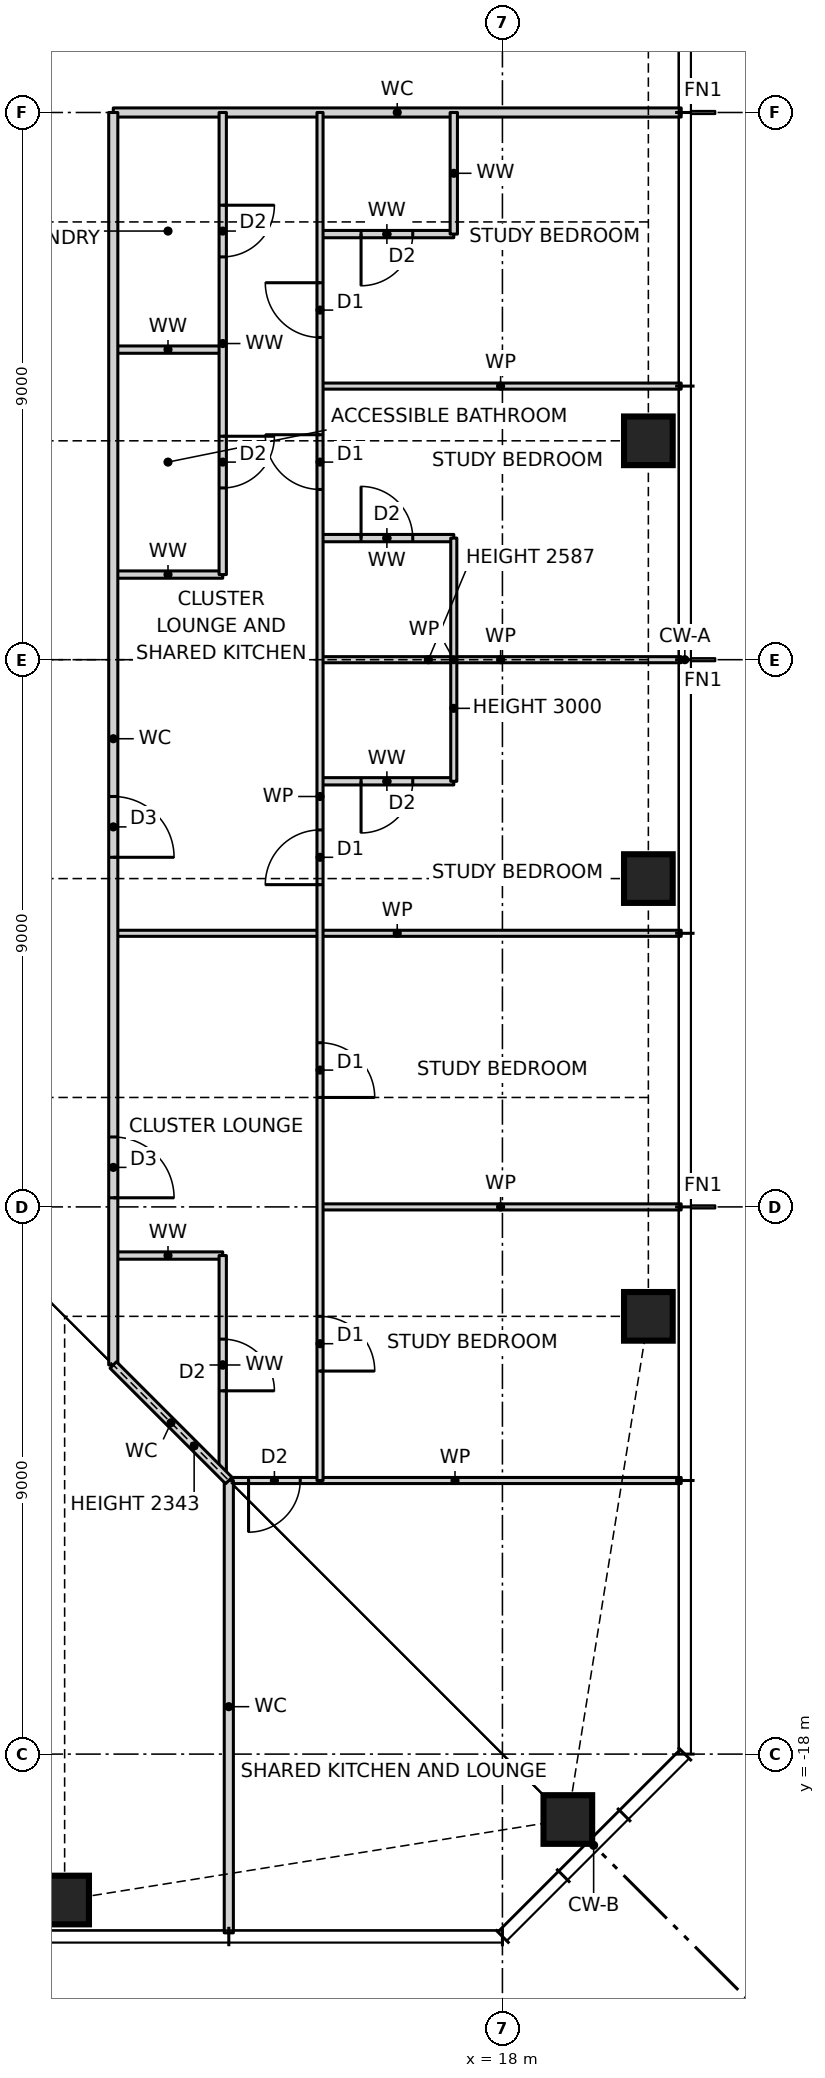
"""IFC4 building model, lengths in metres.
Left out: names, types, materials, properties, quantities, classifications, styles, units other than length and angle.
Written with IfcOpenShell. Run it as: python <this file> out.ifc"""

import sys

from ifc_helpers import new_model, si_unit, direction, frame, frame_2d, origin, origin_2d, place, context, subcontext, project, spatial, rectangle, hollow_rectangle, extrude, element, fill, save


model = new_model("IFC4")
c1 = context("Model", 3, precision=1e-05, world=origin(), true_north=direction((0.0, 1.0)))
c2 = subcontext(c1, "Body", "Model", "MODEL_VIEW")
j1 = project(units=[si_unit("LENGTHUNIT", "METRE"), si_unit("PLANEANGLEUNIT", "RADIAN")], contexts=[c1])
p1 = place(None, origin())
s1 = spatial("IfcSite", under=j1, at=p1, CompositionType="ELEMENT")
p2 = place(p1, origin())
s2 = spatial("IfcBuilding", under=s1, at=p2, CompositionType="ELEMENT")
p3 = place(p2, frame((0.0, 0.0, 136.5)))
s3 = spatial("IfcBuildingStorey", under=s2, at=p3, CompositionType="ELEMENT", Elevation=136.5)
for number, where, z_axis, x_axis in (
    (1, (10.8, -20.4, 0.0), (0.0, 0.0, 1.0), (1.0, 0.0, 0.0)),
    (2, (19.076, -19.076, 0.0), (0.0, 0.0, 1.0), (1.0, 0.0, 0.0)),
    (3, (20.4, -10.8, 0.0), (0.0, 0.0, 1.0), (1.0, 0.0, 0.0)),
    (4, (20.4, -3.6, 0.0), (0.0, 0.0, 1.0), (1.0, 0.0, 0.0)),
    (5, (20.4, 3.6, 0.0), (0.0, 0.0, 1.0), (1.0, 0.0, 0.0)),
):
    element("IfcColumn", number, at=place(p3, frame(where, z_axis=z_axis, x_axis=x_axis)), inside=s3, PredefinedType="COLUMN", context=c2, shape_type="SweptSolid", body=[
        extrude(hollow_rectangle(XDim=0.8, YDim=0.8, WallThickness=0.07, at=origin_2d()), origin(), (0.0, 0.0, 1.0), 3.5),
    ])
p4 = place(p3, frame((13.5, -13.5, 0.0), z_axis=(0.0, 0.0, 1.0), x_axis=(1.0, 0.0, 0.0)))
e6 = element("IfcWall", 6, at=p4, inside=s3, PredefinedType="PARTITIONING", context=c2, shape_type="SweptSolid", body=[
    extrude(rectangle(XDim=7.44, YDim=0.1, at=frame_2d((3.72, 0.0))), origin(), (0.0, 0.0, 1.0), 3.27),
])
p5 = place(p4, frame((0.325, 0.0, 0.0)))
e7 = element("IfcOpeningElement", 7, at=p5, cuts=e6, PredefinedType="OPENING", context=c2, shape_type="SweptSolid", body=[
    extrude(rectangle(XDim=0.85, YDim=2.1, at=frame_2d((0.425, 1.05))), frame((0.0, 0.06, 0.0), z_axis=(0.0, -1.0, 0.0), x_axis=(1.0, 0.0, 0.0)), (0.0, 0.0, 1.0), 0.12),
])
p6 = place(p3, frame((11.6, -9.8, 0.0), z_axis=(0.0, 0.0, 1.0), x_axis=(1.0, 0.0, 0.0)))
e8 = element("IfcWall", 8, at=p6, inside=s3, PredefinedType="PARTITIONING", context=c2, shape_type="SweptSolid", body=[
    extrude(rectangle(XDim=1.8, YDim=0.12, at=frame_2d((0.9, 0.0))), origin(), (0.0, 0.0, 1.0), 3.27),
])
p7 = place(p3, frame((15.0, -9.0, 0.0), z_axis=(0.0, 0.0, 1.0), x_axis=(1.0, 0.0, 0.0)))
e9 = element("IfcWall", 9, at=p7, inside=s3, PredefinedType="PARTITIONING", context=c2, shape_type="SweptSolid", body=[
    extrude(rectangle(XDim=5.94, YDim=0.1, at=frame_2d((2.97, 0.0))), origin(), (0.0, 0.0, 1.0), 3.27),
])
p8 = place(p3, frame((11.6, -4.5, 0.0), z_axis=(0.0, 0.0, 1.0), x_axis=(1.0, 0.0, 0.0)))
e10 = element("IfcWall", 10, at=p8, inside=s3, PredefinedType="PARTITIONING", context=c2, shape_type="SweptSolid", body=[
    extrude(rectangle(XDim=9.34, YDim=0.1, at=frame_2d((4.67, 0.0))), origin(), (0.0, 0.0, 1.0), 3.27),
])
p9 = place(p3, frame((15.0, -2.0, 0.0), z_axis=(0.0, 0.0, 1.0), x_axis=(1.0, 0.0, 0.0)))
e11 = element("IfcWall", 11, at=p9, inside=s3, PredefinedType="PARTITIONING", context=c2, shape_type="SweptSolid", body=[
    extrude(rectangle(XDim=2.2, YDim=0.12, at=frame_2d((1.1, 0.0))), origin(), (0.0, 0.0, 1.0), 3.27),
])
p10 = place(p9, frame((0.675, 0.0, 0.0)))
e12 = element("IfcOpeningElement", 12, at=p10, cuts=e11, PredefinedType="OPENING", context=c2, shape_type="SweptSolid", body=[
    extrude(rectangle(XDim=0.85, YDim=2.1, at=frame_2d((0.425, 1.05))), frame((0.0, 0.07, 0.0), z_axis=(0.0, -1.0, 0.0), x_axis=(1.0, 0.0, 0.0)), (0.0, 0.0, 1.0), 0.14),
])
p11 = place(p3, frame((15.0, 0.0, 0.0), z_axis=(0.0, 0.0, 1.0), x_axis=(1.0, 0.0, 0.0)))
e13 = element("IfcWall", 13, at=p11, inside=s3, PredefinedType="PARTITIONING", context=c2, shape_type="SweptSolid", body=[
    extrude(rectangle(XDim=5.94, YDim=0.1, at=frame_2d((2.97, 0.0))), origin(), (0.0, 0.0, 1.0), 2.587),
])
p12 = place(p3, frame((11.6, 1.4, 0.0), z_axis=(0.0, 0.0, 1.0), x_axis=(1.0, 0.0, 0.0)))
e14 = element("IfcWall", 14, at=p12, inside=s3, PredefinedType="PARTITIONING", context=c2, shape_type="SweptSolid", body=[
    extrude(rectangle(XDim=1.8, YDim=0.12, at=frame_2d((0.9, 0.0))), origin(), (0.0, 0.0, 1.0), 3.27),
])
p13 = place(p3, frame((15.0, 2.0, 0.0), z_axis=(0.0, 0.0, 1.0), x_axis=(1.0, 0.0, 0.0)))
e15 = element("IfcWall", 15, at=p13, inside=s3, PredefinedType="PARTITIONING", context=c2, shape_type="SweptSolid", body=[
    extrude(rectangle(XDim=2.2, YDim=0.12, at=frame_2d((1.1, 0.0))), origin(), (0.0, 0.0, 1.0), 3.27),
])
p14 = place(p13, frame((0.675, 0.0, 0.0)))
e16 = element("IfcOpeningElement", 16, at=p14, cuts=e15, PredefinedType="OPENING", context=c2, shape_type="SweptSolid", body=[
    extrude(rectangle(XDim=0.85, YDim=2.1, at=frame_2d((0.425, 1.05))), frame((0.0, 0.07, 0.0), z_axis=(0.0, -1.0, 0.0), x_axis=(1.0, 0.0, 0.0)), (0.0, 0.0, 1.0), 0.14),
])
p15 = place(p3, frame((15.0, 4.5, 0.0), z_axis=(0.0, 0.0, 1.0), x_axis=(1.0, 0.0, 0.0)))
e17 = element("IfcWall", 17, at=p15, inside=s3, PredefinedType="PARTITIONING", context=c2, shape_type="SweptSolid", body=[
    extrude(rectangle(XDim=5.94, YDim=0.1, at=frame_2d((2.97, 0.0))), origin(), (0.0, 0.0, 1.0), 3.27),
])
p16 = place(p3, frame((11.6, 5.1, 0.0), z_axis=(0.0, 0.0, 1.0), x_axis=(1.0, 0.0, 0.0)))
e18 = element("IfcWall", 18, at=p16, inside=s3, PredefinedType="PARTITIONING", context=c2, shape_type="SweptSolid", body=[
    extrude(rectangle(XDim=1.8, YDim=0.12, at=frame_2d((0.9, 0.0))), origin(), (0.0, 0.0, 1.0), 3.27),
])
p17 = place(p3, frame((15.0, 7.0, 0.0), z_axis=(0.0, 0.0, 1.0), x_axis=(1.0, 0.0, 0.0)))
e19 = element("IfcWall", 19, at=p17, inside=s3, PredefinedType="PARTITIONING", context=c2, shape_type="SweptSolid", body=[
    extrude(rectangle(XDim=2.2, YDim=0.12, at=frame_2d((1.1, 0.0))), origin(), (0.0, 0.0, 1.0), 3.27),
])
p18 = place(p17, frame((0.675, 0.0, 0.0)))
e20 = element("IfcOpeningElement", 20, at=p18, cuts=e19, PredefinedType="OPENING", context=c2, shape_type="SweptSolid", body=[
    extrude(rectangle(XDim=0.85, YDim=2.1, at=frame_2d((0.425, 1.05))), frame((0.0, 0.07, 0.0), z_axis=(0.0, -1.0, 0.0), x_axis=(1.0, 0.0, 0.0)), (0.0, 0.0, 1.0), 0.14),
])
p19 = place(p3, frame((11.6, 9.0, 0.0), z_axis=(0.0, 0.0, 1.0), x_axis=(1.0, 0.0, 0.0)))
e21 = element("IfcWall", 21, at=p19, inside=s3, PredefinedType="PARTITIONING", context=c2, shape_type="SweptSolid", body=[
    extrude(rectangle(XDim=9.34, YDim=0.15, at=frame_2d((4.67, 0.0))), origin(), (0.0, 0.0, 1.0), 3.27),
])
p20 = place(p3, frame((17.2, -2.0, 0.0), z_axis=(0.0, 0.0, 1.0), x_axis=(0.0, 1.0, 0.0)))
e22 = element("IfcWall", 22, at=p20, inside=s3, PredefinedType="PARTITIONING", context=c2, shape_type="SweptSolid", body=[
    extrude(rectangle(XDim=4.0, YDim=0.1, at=frame_2d((2.0, 0.0))), origin(), (0.0, 0.0, 1.0), 3.0),
])
p21 = place(p3, frame((17.2, 7.0, 0.0), z_axis=(0.0, 0.0, 1.0), x_axis=(0.0, 1.0, 0.0)))
e23 = element("IfcWall", 23, at=p21, inside=s3, PredefinedType="PARTITIONING", context=c2, shape_type="SweptSolid", body=[
    extrude(rectangle(XDim=2.0, YDim=0.12, at=frame_2d((1.0, 0.0))), origin(), (0.0, 0.0, 1.0), 3.27),
])
p22 = place(p3, frame((15.0, -13.5, 0.0), z_axis=(0.0, 0.0, 1.0), x_axis=(0.0, 1.0, 0.0)))
e24 = element("IfcWall", 24, at=p22, inside=s3, PredefinedType="PARTITIONING", context=c2, shape_type="SweptSolid", body=[
    extrude(rectangle(XDim=22.5, YDim=0.1, at=frame_2d((11.25, 0.0))), origin(), (0.0, 0.0, 1.0), 3.27),
])
p23 = place(p22, frame((1.8, 0.0, 0.0)))
e25 = element("IfcOpeningElement", 25, at=p23, cuts=e24, PredefinedType="OPENING", context=c2, shape_type="SweptSolid", body=[
    extrude(rectangle(XDim=0.9, YDim=2.1, at=frame_2d((0.45, 1.05))), frame((0.0, 0.06, 0.0), z_axis=(0.0, -1.0, 0.0), x_axis=(1.0, 0.0, 0.0)), (0.0, 0.0, 1.0), 0.12),
])
p24 = place(p22, frame((6.3, 0.0, 0.0)))
e26 = element("IfcOpeningElement", 26, at=p24, cuts=e24, PredefinedType="OPENING", context=c2, shape_type="SweptSolid", body=[
    extrude(rectangle(XDim=0.9, YDim=2.1, at=frame_2d((0.45, 1.05))), frame((0.0, 0.06, 0.0), z_axis=(0.0, -1.0, 0.0), x_axis=(1.0, 0.0, 0.0)), (0.0, 0.0, 1.0), 0.12),
])
p25 = place(p22, frame((9.8, 0.0, 0.0)))
e27 = element("IfcOpeningElement", 27, at=p25, cuts=e24, PredefinedType="OPENING", context=c2, shape_type="SweptSolid", body=[
    extrude(rectangle(XDim=0.9, YDim=2.1, at=frame_2d((0.45, 1.05))), frame((0.0, 0.06, 0.0), z_axis=(0.0, -1.0, 0.0), x_axis=(1.0, 0.0, 0.0)), (0.0, 0.0, 1.0), 0.12),
])
p26 = place(p22, frame((16.3, 0.0, 0.0)))
e28 = element("IfcOpeningElement", 28, at=p26, cuts=e24, PredefinedType="OPENING", context=c2, shape_type="SweptSolid", body=[
    extrude(rectangle(XDim=0.9, YDim=2.1, at=frame_2d((0.45, 1.05))), frame((0.0, 0.06, 0.0), z_axis=(0.0, -1.0, 0.0), x_axis=(1.0, 0.0, 0.0)), (0.0, 0.0, 1.0), 0.12),
])
p27 = place(p22, frame((18.8, 0.0, 0.0)))
e29 = element("IfcOpeningElement", 29, at=p27, cuts=e24, PredefinedType="OPENING", context=c2, shape_type="SweptSolid", body=[
    extrude(rectangle(XDim=0.9, YDim=2.1, at=frame_2d((0.45, 1.05))), frame((0.0, 0.06, 0.0), z_axis=(0.0, -1.0, 0.0), x_axis=(1.0, 0.0, 0.0)), (0.0, 0.0, 1.0), 0.12),
])
p28 = place(p3, frame((13.5, -20.94, 0.0), z_axis=(0.0, 0.0, 1.0), x_axis=(0.0, 1.0, 0.0)))
e30 = element("IfcWall", 30, at=p28, inside=s3, PredefinedType="PARTITIONING", context=c2, shape_type="SweptSolid", body=[
    extrude(rectangle(XDim=7.44, YDim=0.15, at=frame_2d((3.72, 0.0))), origin(), (0.0, 0.0, 1.0), 3.27),
])
p29 = place(p3, frame((13.4, -13.4, 0.0), z_axis=(0.0, 0.0, 1.0), x_axis=(0.0, 1.0, 0.0)))
e31 = element("IfcWall", 31, at=p29, inside=s3, PredefinedType="PARTITIONING", context=c2, shape_type="SweptSolid", body=[
    extrude(rectangle(XDim=3.6, YDim=0.12, at=frame_2d((1.8, 0.0))), origin(), (0.0, 0.0, 1.0), 3.27),
])
p30 = place(p29, frame((1.375, 0.0, 0.0)))
e32 = element("IfcOpeningElement", 32, at=p30, cuts=e31, PredefinedType="OPENING", context=c2, shape_type="SweptSolid", body=[
    extrude(rectangle(XDim=0.85, YDim=2.1, at=frame_2d((0.425, 1.05))), frame((0.0, 0.07, 0.0), z_axis=(0.0, -1.0, 0.0), x_axis=(1.0, 0.0, 0.0)), (0.0, 0.0, 1.0), 0.14),
])
p31 = place(p3, frame((13.4, 1.4, 0.0), z_axis=(0.0, 0.0, 1.0), x_axis=(0.0, 1.0, 0.0)))
e33 = element("IfcWall", 33, at=p31, inside=s3, PredefinedType="PARTITIONING", context=c2, shape_type="SweptSolid", body=[
    extrude(rectangle(XDim=7.6, YDim=0.12, at=frame_2d((3.8, 0.0))), origin(), (0.0, 0.0, 1.0), 3.27),
])
p32 = place(p31, frame((1.425, 0.0, 0.0)))
e34 = element("IfcOpeningElement", 34, at=p32, cuts=e33, PredefinedType="OPENING", context=c2, shape_type="SweptSolid", body=[
    extrude(rectangle(XDim=0.85, YDim=2.1, at=frame_2d((0.425, 1.05))), frame((0.0, 0.07, 0.0), z_axis=(0.0, -1.0, 0.0), x_axis=(1.0, 0.0, 0.0)), (0.0, 0.0, 1.0), 0.14),
])
p33 = place(p31, frame((5.225, 0.0, 0.0)))
e35 = element("IfcOpeningElement", 35, at=p33, cuts=e33, PredefinedType="OPENING", context=c2, shape_type="SweptSolid", body=[
    extrude(rectangle(XDim=0.85, YDim=2.1, at=frame_2d((0.425, 1.05))), frame((0.0, 0.07, 0.0), z_axis=(0.0, -1.0, 0.0), x_axis=(1.0, 0.0, 0.0)), (0.0, 0.0, 1.0), 0.14),
])
p34 = place(p3, frame((11.6, -11.6, 0.0), z_axis=(0.0, 0.0, 1.0), x_axis=(0.0, 1.0, 0.0)))
e36 = element("IfcWall", 36, at=p34, inside=s3, PredefinedType="PARTITIONING", context=c2, shape_type="SweptSolid", body=[
    extrude(rectangle(XDim=20.6, YDim=0.15, at=frame_2d((10.3, 0.0))), origin(), (0.0, 0.0, 1.0), 3.27),
])
p35 = place(p34, frame((2.75, 0.0, 0.0)))
e37 = element("IfcOpeningElement", 37, at=p35, cuts=e36, PredefinedType="OPENING", context=c2, shape_type="SweptSolid", body=[
    extrude(rectangle(XDim=1.0, YDim=2.1, at=frame_2d((0.5, 1.05))), frame((0.0, 0.085, 0.0), z_axis=(0.0, -1.0, 0.0), x_axis=(1.0, 0.0, 0.0)), (0.0, 0.0, 1.0), 0.17),
])
p36 = place(p34, frame((8.35, 0.0, 0.0)))
e38 = element("IfcOpeningElement", 38, at=p36, cuts=e36, PredefinedType="OPENING", context=c2, shape_type="SweptSolid", body=[
    extrude(rectangle(XDim=1.0, YDim=2.1, at=frame_2d((0.5, 1.05))), frame((0.0, 0.085, 0.0), z_axis=(0.0, -1.0, 0.0), x_axis=(1.0, 0.0, 0.0)), (0.0, 0.0, 1.0), 0.17),
])
p37 = place(p3, frame((13.5, -13.5, 0.0), z_axis=(0.0, 0.0, 1.0), x_axis=(-0.707106781187, 0.707106781187, 0.0)))
e39 = element("IfcWall", 39, at=p37, inside=s3, PredefinedType="PARTITIONING", context=c2, shape_type="SweptSolid", body=[
    extrude(rectangle(XDim=2.687, YDim=0.15, at=frame_2d((1.343, 0.0))), origin(), (0.0, 0.0, 1.0), 2.343),
])
p38 = place(p23, frame((0.9, 0.0, 0.0), z_axis=(0.0, 0.0, 1.0), x_axis=(-1.0, 0.0, 0.0)))
e40 = element("IfcDoor", 40, at=p38, inside=s3, OperationType="SINGLE_SWING_RIGHT", PredefinedType="DOOR", context=c2, shape_type="SweptSolid", body=[
    extrude(rectangle(XDim=0.9, YDim=2.1, at=frame_2d((0.45, 1.05))), frame((0.0, 0.025, 0.0), z_axis=(0.0, -1.0, 0.0), x_axis=(1.0, 0.0, 0.0)), (0.0, 0.0, 1.0), 0.05),
])
fill(e25, e40)
p39 = place(p24, frame((0.9, 0.0, 0.0), z_axis=(0.0, 0.0, 1.0), x_axis=(-1.0, 0.0, 0.0)))
e41 = element("IfcDoor", 41, at=p39, inside=s3, OperationType="SINGLE_SWING_RIGHT", PredefinedType="DOOR", context=c2, shape_type="SweptSolid", body=[
    extrude(rectangle(XDim=0.9, YDim=2.1, at=frame_2d((0.45, 1.05))), frame((0.0, 0.025, 0.0), z_axis=(0.0, -1.0, 0.0), x_axis=(1.0, 0.0, 0.0)), (0.0, 0.0, 1.0), 0.05),
])
fill(e26, e41)
p40 = place(p35, frame((1.0, 0.0, 0.0), z_axis=(0.0, 0.0, 1.0), x_axis=(-1.0, 0.0, 0.0)))
e42 = element("IfcDoor", 42, at=p40, inside=s3, OperationType="SINGLE_SWING_RIGHT", PredefinedType="DOOR", context=c2, shape_type="SweptSolid", body=[
    extrude(rectangle(XDim=1.0, YDim=2.1, at=frame_2d((0.5, 1.05))), frame((0.0, 0.025, 0.0), z_axis=(0.0, -1.0, 0.0), x_axis=(1.0, 0.0, 0.0)), (0.0, 0.0, 1.0), 0.05),
])
fill(e37, e42)
p41 = place(p30, frame((0.85, 0.0, 0.0), z_axis=(0.0, 0.0, 1.0), x_axis=(-1.0, 0.0, 0.0)))
e43 = element("IfcDoor", 43, at=p41, inside=s3, OperationType="SINGLE_SWING_RIGHT", PredefinedType="DOOR", context=c2, shape_type="SweptSolid", body=[
    extrude(rectangle(XDim=0.85, YDim=2.1, at=frame_2d((0.425, 1.05))), frame((0.0, 0.025, 0.0), z_axis=(0.0, -1.0, 0.0), x_axis=(1.0, 0.0, 0.0)), (0.0, 0.0, 1.0), 0.05),
])
fill(e32, e43)
p42 = place(p10, frame((0.85, 0.0, 0.0), z_axis=(0.0, 0.0, 1.0), x_axis=(-1.0, 0.0, 0.0)))
e44 = element("IfcDoor", 44, at=p42, inside=s3, OperationType="SINGLE_SWING_RIGHT", PredefinedType="DOOR", context=c2, shape_type="SweptSolid", body=[
    extrude(rectangle(XDim=0.85, YDim=2.1, at=frame_2d((0.425, 1.05))), frame((0.0, 0.025, 0.0), z_axis=(0.0, -1.0, 0.0), x_axis=(1.0, 0.0, 0.0)), (0.0, 0.0, 1.0), 0.05),
])
fill(e12, e44)
p43 = place(p25, origin())
e45 = element("IfcDoor", 45, at=p43, inside=s3, OperationType="SINGLE_SWING_LEFT", PredefinedType="DOOR", context=c2, shape_type="SweptSolid", body=[
    extrude(rectangle(XDim=0.9, YDim=2.1, at=frame_2d((0.45, 1.05))), frame((0.0, 0.025, 0.0), z_axis=(0.0, -1.0, 0.0), x_axis=(1.0, 0.0, 0.0)), (0.0, 0.0, 1.0), 0.05),
])
fill(e27, e45)
p44 = place(p14, origin())
e46 = element("IfcDoor", 46, at=p44, inside=s3, OperationType="SINGLE_SWING_LEFT", PredefinedType="DOOR", context=c2, shape_type="SweptSolid", body=[
    extrude(rectangle(XDim=0.85, YDim=2.1, at=frame_2d((0.425, 1.05))), frame((0.0, 0.025, 0.0), z_axis=(0.0, -1.0, 0.0), x_axis=(1.0, 0.0, 0.0)), (0.0, 0.0, 1.0), 0.05),
])
fill(e16, e46)
p45 = place(p26, origin())
e47 = element("IfcDoor", 47, at=p45, inside=s3, OperationType="SINGLE_SWING_RIGHT", PredefinedType="DOOR", context=c2, shape_type="SweptSolid", body=[
    extrude(rectangle(XDim=0.9, YDim=2.1, at=frame_2d((0.45, 1.05))), frame((0.0, 0.025, 0.0), z_axis=(0.0, -1.0, 0.0), x_axis=(1.0, 0.0, 0.0)), (0.0, 0.0, 1.0), 0.05),
])
fill(e28, e47)
p46 = place(p18, frame((0.85, 0.0, 0.0), z_axis=(0.0, 0.0, 1.0), x_axis=(-1.0, 0.0, 0.0)))
e48 = element("IfcDoor", 48, at=p46, inside=s3, OperationType="SINGLE_SWING_RIGHT", PredefinedType="DOOR", context=c2, shape_type="SweptSolid", body=[
    extrude(rectangle(XDim=0.85, YDim=2.1, at=frame_2d((0.425, 1.05))), frame((0.0, 0.025, 0.0), z_axis=(0.0, -1.0, 0.0), x_axis=(1.0, 0.0, 0.0)), (0.0, 0.0, 1.0), 0.05),
])
fill(e20, e48)
p47 = place(p27, origin())
e49 = element("IfcDoor", 49, at=p47, inside=s3, OperationType="SINGLE_SWING_RIGHT", PredefinedType="DOOR", context=c2, shape_type="SweptSolid", body=[
    extrude(rectangle(XDim=0.9, YDim=2.1, at=frame_2d((0.45, 1.05))), frame((0.0, 0.025, 0.0), z_axis=(0.0, -1.0, 0.0), x_axis=(1.0, 0.0, 0.0)), (0.0, 0.0, 1.0), 0.05),
])
fill(e29, e49)
p48 = place(p36, frame((1.0, 0.0, 0.0), z_axis=(0.0, 0.0, 1.0), x_axis=(-1.0, 0.0, 0.0)))
e50 = element("IfcDoor", 50, at=p48, inside=s3, OperationType="SINGLE_SWING_RIGHT", PredefinedType="DOOR", context=c2, shape_type="SweptSolid", body=[
    extrude(rectangle(XDim=1.0, YDim=2.1, at=frame_2d((0.5, 1.05))), frame((0.0, 0.025, 0.0), z_axis=(0.0, -1.0, 0.0), x_axis=(1.0, 0.0, 0.0)), (0.0, 0.0, 1.0), 0.05),
])
fill(e38, e50)
p49 = place(p32, frame((0.85, 0.0, 0.0), z_axis=(0.0, 0.0, 1.0), x_axis=(-1.0, 0.0, 0.0)))
e51 = element("IfcDoor", 51, at=p49, inside=s3, OperationType="SINGLE_SWING_LEFT", PredefinedType="DOOR", context=c2, shape_type="SweptSolid", body=[
    extrude(rectangle(XDim=0.85, YDim=2.1, at=frame_2d((0.425, 1.05))), frame((0.0, 0.025, 0.0), z_axis=(0.0, -1.0, 0.0), x_axis=(1.0, 0.0, 0.0)), (0.0, 0.0, 1.0), 0.05),
])
fill(e34, e51)
p50 = place(p33, frame((0.85, 0.0, 0.0), z_axis=(0.0, 0.0, 1.0), x_axis=(-1.0, 0.0, 0.0)))
e52 = element("IfcDoor", 52, at=p50, inside=s3, OperationType="SINGLE_SWING_LEFT", PredefinedType="DOOR", context=c2, shape_type="SweptSolid", body=[
    extrude(rectangle(XDim=0.85, YDim=2.1, at=frame_2d((0.425, 1.05))), frame((0.0, 0.025, 0.0), z_axis=(0.0, -1.0, 0.0), x_axis=(1.0, 0.0, 0.0)), (0.0, 0.0, 1.0), 0.05),
])
fill(e35, e52)
p51 = place(p5, frame((0.85, 0.0, 0.0), z_axis=(0.0, 0.0, 1.0), x_axis=(-1.0, 0.0, 0.0)))
e53 = element("IfcDoor", 53, at=p51, inside=s3, OperationType="SINGLE_SWING_RIGHT", PredefinedType="DOOR", context=c2, shape_type="SweptSolid", body=[
    extrude(rectangle(XDim=0.85, YDim=2.1, at=frame_2d((0.425, 1.05))), frame((0.0, 0.025, 0.0), z_axis=(0.0, -1.0, 0.0), x_axis=(1.0, 0.0, 0.0)), (0.0, 0.0, 1.0), 0.05),
])
fill(e7, e53)
save(model, sys.argv[1])
